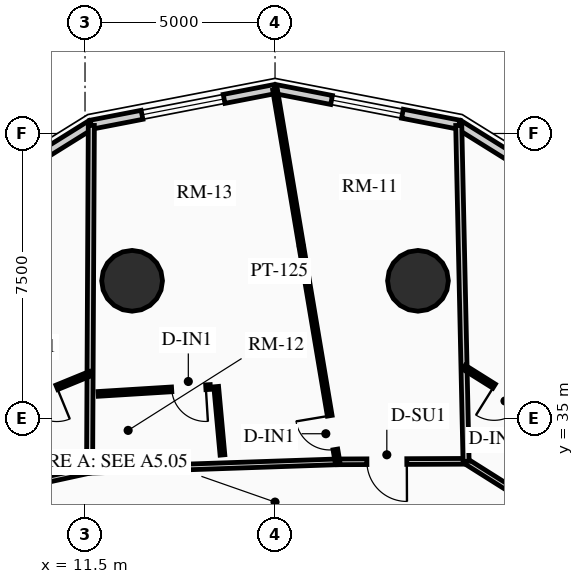
"""IFC4 building model, lengths in metres.
Left out: names, types, materials, properties, quantities, classifications, styles, units other than length and angle.
Written with IfcOpenShell. Run it as: python <this file> out.ifc"""

import sys

from ifc_helpers import new_model, si_unit, direction, frame, frame_2d, origin, origin_2d, place, context, subcontext, project, spatial, rectangle, circle, extrude, source, transform, mapped, element, fill, save


model = new_model("IFC4")
c1 = context("Model", 3, precision=1e-05, world=origin(), true_north=direction((0.0, 1.0)))
c2 = subcontext(c1, "Body", "Model", "MODEL_VIEW")
j1 = project(units=[si_unit("LENGTHUNIT", "METRE"), si_unit("PLANEANGLEUNIT", "RADIAN")], contexts=[c1])
p1 = place(None, origin())
s1 = spatial("IfcSite", under=j1, at=p1, CompositionType="ELEMENT")
p2 = place(p1, origin())
s2 = spatial("IfcBuilding", under=s1, at=p2, CompositionType="ELEMENT")
p3 = place(p2, frame((0.0, 0.0, 62.74)))
s3 = spatial("IfcBuildingStorey", under=s2, at=p3, CompositionType="ELEMENT", Elevation=62.74)
for number, where, z_axis, x_axis in (
    (1, (20.261, 38.623, 0.0), (0.0, 0.0, 1.0), (1.0, 0.0, 0.0)),
    (2, (12.739, 38.623, 0.0), (0.0, 0.0, 1.0), (1.0, 0.0, 0.0)),
):
    element("IfcColumn", number, at=place(p3, frame(where, z_axis=z_axis, x_axis=x_axis)), inside=s3, PredefinedType="USERDEFINED", context=c2, shape_type="SweptSolid", body=[
        extrude(circle(Radius=0.8, at=origin_2d()), origin(), (0.0, 0.0, 1.0), 2.91),
    ])
p4 = place(p3, frame((21.34, 42.732, 0.0), z_axis=(0.0, 0.0, 1.0), x_axis=(0.848533613342, -0.529141481107, 0.0)))
e3 = element("IfcWall", 3, at=p4, inside=s3, PredefinedType="SOLIDWALL", context=c2, shape_type="SweptSolid", body=[
    extrude(rectangle(XDim=5.146, YDim=0.24, at=frame_2d((2.573, 0.0))), origin(), (0.0, 0.0, 1.0), 2.079),
])
p5 = place(p3, frame((16.5, 43.67, 0.0), z_axis=(0.0, 0.0, 1.0), x_axis=(0.981725274071, -0.190303668512, 0.0)))
e4 = element("IfcWall", 4, at=p5, inside=s3, PredefinedType="SOLIDWALL", context=c2, shape_type="SweptSolid", body=[
    extrude(rectangle(XDim=4.93, YDim=0.24, at=frame_2d((2.465, 0.0))), origin(), (0.0, 0.0, 1.0), 2.079),
])
m1 = source(origin(), c2, "Body", "SweptSolid", [
    extrude(rectangle(XDim=1.9, YDim=1.35, at=frame_2d((0.95, 0.675))), frame((0.0, 0.13, 0.0), z_axis=(0.0, -1.0, 0.0), x_axis=(1.0, 0.0, 0.0)), (0.0, 0.0, 1.0), 0.26),
])
p6 = place(p5, frame((1.515, 0.0, 0.65)))
e5 = element("IfcOpeningElement", 5, at=p6, cuts=e4, PredefinedType="OPENING", context=c2, shape_type="MappedRepresentation", body=[
    mapped(m1, transform((0.0, 0.0, 0.0), x_axis=(1.0, 0.0, 0.0), y_axis=(0.0, 1.0, 0.0), z_axis=(0.0, 0.0, 1.0), scale=1.0)),
])
p7 = place(p3, frame((11.66, 42.732, 0.0), z_axis=(0.0, 0.0, 1.0), x_axis=(0.981725274071, 0.190303668512, 0.0)))
e6 = element("IfcWall", 6, at=p7, inside=s3, PredefinedType="SOLIDWALL", context=c2, shape_type="SweptSolid", body=[
    extrude(rectangle(XDim=4.93, YDim=0.24, at=frame_2d((2.465, 0.0))), origin(), (0.0, 0.0, 1.0), 2.079),
])
m2 = source(origin(), c2, "Body", "SweptSolid", [
    extrude(rectangle(XDim=2.2, YDim=1.35, at=frame_2d((1.1, 0.675))), frame((0.0, 0.13, 0.0), z_axis=(0.0, -1.0, 0.0), x_axis=(1.0, 0.0, 0.0)), (0.0, 0.0, 1.0), 0.26),
])
p8 = place(p7, frame((1.365, 0.0, 0.65)))
e7 = element("IfcOpeningElement", 7, at=p8, cuts=e6, PredefinedType="OPENING", context=c2, shape_type="MappedRepresentation", body=[
    mapped(m2, transform((0.0, 0.0, 0.0), x_axis=(1.0, 0.0, 0.0), y_axis=(0.0, 1.0, 0.0), z_axis=(0.0, 0.0, 1.0), scale=1.0)),
])
p9 = place(p3, frame((7.293, 40.009, 0.0), z_axis=(0.0, 0.0, 1.0), x_axis=(0.848533613342, 0.529141481107, 0.0)))
e8 = element("IfcWall", 8, at=p9, inside=s3, PredefinedType="SOLIDWALL", context=c2, shape_type="SweptSolid", body=[
    extrude(rectangle(XDim=5.146, YDim=0.24, at=frame_2d((2.573, 0.0))), origin(), (0.0, 0.0, 1.0), 2.079),
])
p10 = place(p3, frame((22.877, 33.022, 0.0), z_axis=(0.0, 0.0, 1.0), x_axis=(-0.845895608855, 0.533348496689, 0.0)))
e9 = element("IfcWall", 9, at=p10, inside=s3, PredefinedType="PARTITIONING", context=c2, shape_type="SweptSolid", body=[
    extrude(rectangle(XDim=1.597, YDim=0.15, at=frame_2d((0.798, 0.0))), origin(), (0.0, 0.0, 1.0), 2.125),
])
p11 = place(p3, frame((21.527, 33.873, 0.0), z_axis=(0.0, 0.0, 1.0), x_axis=(-0.999991838845, -0.004040079574, 0.0)))
e10 = element("IfcWall", 10, at=p11, inside=s3, PredefinedType="PARTITIONING", context=c2, shape_type="SweptSolid", body=[
    extrude(rectangle(XDim=3.384, YDim=0.15, at=frame_2d((1.692, 0.0))), origin(), (0.0, 0.0, 1.0), 2.079),
])
m3 = source(origin(), c2, "Body", "SweptSolid", [
    extrude(rectangle(XDim=1.05, YDim=2.015, at=frame_2d((0.525, 1.007))), frame((0.0, 0.085, 0.0), z_axis=(0.0, -1.0, 0.0), x_axis=(1.0, 0.0, 0.0)), (0.0, 0.0, 1.0), 0.17),
])
p12 = place(p11, frame((1.56, 0.0, 0.0)))
e11 = element("IfcOpeningElement", 11, at=p12, cuts=e10, PredefinedType="OPENING", context=c2, shape_type="MappedRepresentation", body=[
    mapped(m3, transform((0.0, 0.0, 0.0), x_axis=(1.0, 0.0, 0.0), y_axis=(0.0, 1.0, 0.0), z_axis=(0.0, 0.0, 1.0), scale=1.0)),
])
p13 = place(p3, frame((18.143, 33.86, 0.0), z_axis=(0.0, 0.0, 1.0), x_axis=(-0.999419208319, -0.034077060363, 0.0)))
e12 = element("IfcWall", 12, at=p13, inside=s3, PredefinedType="PARTITIONING", context=c2, shape_type="SweptSolid", body=[
    extrude(rectangle(XDim=6.527, YDim=0.15, at=frame_2d((3.263, 0.0))), origin(), (0.0, 0.0, 1.0), 2.079),
])
p14 = place(p3, frame((11.62, 33.637, 0.0), z_axis=(0.0, 0.0, 1.0), x_axis=(-0.97702579435, -0.213121085711, 0.0)))
e13 = element("IfcWall", 13, at=p14, inside=s3, PredefinedType="PARTITIONING", context=c2, shape_type="SweptSolid", body=[
    extrude(rectangle(XDim=1.935, YDim=0.15, at=frame_2d((0.967, 0.0))), origin(), (0.0, 0.0, 1.0), 2.079),
])
p15 = place(p3, frame((21.527, 33.873, 0.0), z_axis=(0.0, 0.0, 1.0), x_axis=(-0.021814395676, 0.999762037758, 0.0)))
e14 = element("IfcWall", 14, at=p15, inside=s3, PredefinedType="PARTITIONING", context=c2, shape_type="SweptSolid", body=[
    extrude(rectangle(XDim=8.842, YDim=0.16, at=frame_2d((4.421, 0.0))), origin(), (0.0, 0.0, 1.0), 2.079),
])
p16 = place(p3, frame((11.62, 33.637, 0.0), z_axis=(0.0, 0.0, 1.0), x_axis=(0.00508426969, 0.999987075017, 0.0)))
e15 = element("IfcWall", 15, at=p16, inside=s3, PredefinedType="PARTITIONING", context=c2, shape_type="SweptSolid", body=[
    extrude(rectangle(XDim=9.075, YDim=0.16, at=frame_2d((4.538, 0.0))), origin(), (0.0, 0.0, 1.0), 2.079),
])
p17 = place(p3, frame((23.666, 34.974, 0.0), z_axis=(0.0, 0.0, 1.0), x_axis=(-0.847319394731, 0.531083650014, 0.0)))
e16 = element("IfcWall", 16, at=p17, inside=s3, PredefinedType="PARTITIONING", context=c2, shape_type="SweptSolid", body=[
    extrude(rectangle(XDim=2.589, YDim=0.125, at=frame_2d((1.294, 0.0))), origin(), (0.0, 0.0, 1.0), 2.125),
])
m4 = source(origin(), c2, "Body", "SweptSolid", [
    extrude(rectangle(XDim=0.9, YDim=2.005, at=frame_2d((0.45, 1.002))), frame((0.0, 0.073, 0.0), z_axis=(0.0, -1.0, 0.0), x_axis=(1.0, 0.0, 0.0)), (0.0, 0.0, 1.0), 0.145),
])
p18 = place(p17, frame((0.754, 0.0, 0.0)))
e17 = element("IfcOpeningElement", 17, at=p18, cuts=e16, PredefinedType="OPENING", context=c2, shape_type="MappedRepresentation", body=[
    mapped(m4, transform((0.0, 0.0, 0.0), x_axis=(1.0, 0.0, 0.0), y_axis=(0.0, 1.0, 0.0), z_axis=(0.0, 0.0, 1.0), scale=1.0)),
])
p19 = place(p3, frame((18.143, 33.86, 0.0), z_axis=(0.0, 0.0, 1.0), x_axis=(-0.165487634719, 0.986211865045, 0.0)))
e18 = element("IfcWall", 18, at=p19, inside=s3, PredefinedType="PARTITIONING", context=c2, shape_type="SweptSolid", body=[
    extrude(rectangle(XDim=9.927, YDim=0.125, at=frame_2d((4.964, 0.0))), origin(), (0.0, 0.0, 1.0), 2.079),
])
p20 = place(p19, frame((0.33, 0.0, 0.0)))
e19 = element("IfcOpeningElement", 19, at=p20, cuts=e18, PredefinedType="OPENING", context=c2, shape_type="MappedRepresentation", body=[
    mapped(m4, transform((0.0, 0.0, 0.0), x_axis=(1.0, 0.0, 0.0), y_axis=(0.0, 1.0, 0.0), z_axis=(0.0, 0.0, 1.0), scale=1.0)),
])
p21 = place(p3, frame((15.116, 34.041, 0.0), z_axis=(0.0, 0.0, 1.0), x_axis=(-0.091011265315, 0.995849862974, 0.0)))
e20 = element("IfcWall", 20, at=p21, inside=s3, PredefinedType="PARTITIONING", context=c2, shape_type="SweptSolid", body=[
    extrude(rectangle(XDim=1.805, YDim=0.125, at=frame_2d((0.903, 0.0))), origin(), (0.0, 0.0, 1.0), 2.555),
])
p22 = place(p3, frame((14.798, 35.829, 0.0), z_axis=(0.0, 0.0, 1.0), x_axis=(-0.998098224752, -0.061643602637, 0.0)))
e21 = element("IfcWall", 21, at=p22, inside=s3, PredefinedType="PARTITIONING", context=c2, shape_type="SweptSolid", body=[
    extrude(rectangle(XDim=2.958, YDim=0.125, at=frame_2d((1.479, 0.0))), origin(), (0.0, 0.0, 1.0), 2.079),
])
p23 = place(p22, frame((0.12, 0.0, 0.0)))
e22 = element("IfcOpeningElement", 22, at=p23, cuts=e21, PredefinedType="OPENING", context=c2, shape_type="MappedRepresentation", body=[
    mapped(m4, transform((0.0, 0.0, 0.0), x_axis=(1.0, 0.0, 0.0), y_axis=(0.0, 1.0, 0.0), z_axis=(0.0, 0.0, 1.0), scale=1.0)),
])
p24 = place(p3, frame((11.633, 36.178, 0.0), z_axis=(0.0, 0.0, 1.0), x_axis=(-0.92528752303, -0.379266396779, 0.0)))
e23 = element("IfcWall", 23, at=p24, inside=s3, PredefinedType="PARTITIONING", context=c2, shape_type="SweptSolid", body=[
    extrude(rectangle(XDim=2.791, YDim=0.125, at=frame_2d((1.395, 0.0))), origin(), (0.0, 0.0, 1.0), 2.079),
])
p25 = place(p24, frame((0.945, 0.0, 0.0)))
e24 = element("IfcOpeningElement", 24, at=p25, cuts=e23, PredefinedType="OPENING", context=c2, shape_type="MappedRepresentation", body=[
    mapped(m4, transform((0.0, 0.0, 0.0), x_axis=(1.0, 0.0, 0.0), y_axis=(0.0, 1.0, 0.0), z_axis=(0.0, 0.0, 1.0), scale=1.0)),
])
m5 = source(origin(), c2, "Body", "SweptSolid", [
    extrude(rectangle(XDim=1.9, YDim=1.35, at=frame_2d((0.95, 0.675))), frame((0.0, 0.03, 0.0), z_axis=(0.0, -1.0, 0.0), x_axis=(1.0, 0.0, 0.0)), (0.0, 0.0, 1.0), 0.06),
])
p26 = place(p6, origin())
e25 = element("IfcWindow", 25, at=p26, inside=s3, PartitioningType="DOUBLE_PANEL_VERTICAL", PredefinedType="WINDOW", context=c2, shape_type="MappedRepresentation", body=[
    mapped(m5, transform((0.0, 0.0, 0.0), x_axis=(1.0, 0.0, 0.0), y_axis=(0.0, 1.0, 0.0), z_axis=(0.0, 0.0, 1.0), scale=1.0)),
])
fill(e5, e25)
m6 = source(origin(), c2, "Body", "SweptSolid", [
    extrude(rectangle(XDim=2.2, YDim=1.35, at=frame_2d((1.1, 0.675))), frame((0.0, 0.03, 0.0), z_axis=(0.0, -1.0, 0.0), x_axis=(1.0, 0.0, 0.0)), (0.0, 0.0, 1.0), 0.06),
])
p27 = place(p8, origin())
e26 = element("IfcWindow", 26, at=p27, inside=s3, PartitioningType="DOUBLE_PANEL_VERTICAL", PredefinedType="WINDOW", context=c2, shape_type="MappedRepresentation", body=[
    mapped(m6, transform((0.0, 0.0, 0.0), x_axis=(1.0, 0.0, 0.0), y_axis=(0.0, 1.0, 0.0), z_axis=(0.0, 0.0, 1.0), scale=1.0)),
])
fill(e7, e26)
m7 = source(origin(), c2, "Body", "SweptSolid", [
    extrude(rectangle(XDim=0.9, YDim=2.005, at=frame_2d((0.45, 1.002))), frame((0.0, 0.025, 0.0), z_axis=(0.0, -1.0, 0.0), x_axis=(1.0, 0.0, 0.0)), (0.0, 0.0, 1.0), 0.05),
])
p28 = place(p18, origin())
e27 = element("IfcDoor", 27, at=p28, inside=s3, OperationType="SINGLE_SWING_RIGHT", PredefinedType="DOOR", context=c2, shape_type="MappedRepresentation", body=[
    mapped(m7, transform((0.0, 0.0, 0.0), x_axis=(1.0, 0.0, 0.0), y_axis=(0.0, 1.0, 0.0), z_axis=(0.0, 0.0, 1.0), scale=1.0)),
])
fill(e17, e27)
m8 = source(origin(), c2, "Body", "SweptSolid", [
    extrude(rectangle(XDim=1.05, YDim=2.015, at=frame_2d((0.525, 1.007))), frame((0.0, 0.025, 0.0), z_axis=(0.0, -1.0, 0.0), x_axis=(1.0, 0.0, 0.0)), (0.0, 0.0, 1.0), 0.05),
])
p29 = place(p12, origin())
e28 = element("IfcDoor", 28, at=p29, inside=s3, OperationType="SINGLE_SWING_LEFT", PredefinedType="DOOR", context=c2, shape_type="MappedRepresentation", body=[
    mapped(m8, transform((0.0, 0.0, 0.0), x_axis=(1.0, 0.0, 0.0), y_axis=(0.0, 1.0, 0.0), z_axis=(0.0, 0.0, 1.0), scale=1.0)),
])
fill(e11, e28)
p30 = place(p20, origin())
e29 = element("IfcDoor", 29, at=p30, inside=s3, OperationType="SINGLE_SWING_RIGHT", PredefinedType="DOOR", context=c2, shape_type="MappedRepresentation", body=[
    mapped(m7, transform((0.0, 0.0, 0.0), x_axis=(1.0, 0.0, 0.0), y_axis=(0.0, 1.0, 0.0), z_axis=(0.0, 0.0, 1.0), scale=1.0)),
])
fill(e19, e29)
p31 = place(p23, origin())
e30 = element("IfcDoor", 30, at=p31, inside=s3, OperationType="SINGLE_SWING_LEFT", PredefinedType="DOOR", context=c2, shape_type="MappedRepresentation", body=[
    mapped(m7, transform((0.0, 0.0, 0.0), x_axis=(1.0, 0.0, 0.0), y_axis=(0.0, 1.0, 0.0), z_axis=(0.0, 0.0, 1.0), scale=1.0)),
])
fill(e22, e30)
p32 = place(p25, origin())
e31 = element("IfcDoor", 31, at=p32, inside=s3, OperationType="SINGLE_SWING_LEFT", PredefinedType="DOOR", context=c2, shape_type="MappedRepresentation", body=[
    mapped(m7, transform((0.0, 0.0, 0.0), x_axis=(1.0, 0.0, 0.0), y_axis=(0.0, 1.0, 0.0), z_axis=(0.0, 0.0, 1.0), scale=1.0)),
])
fill(e24, e31)
save(model, sys.argv[1])
